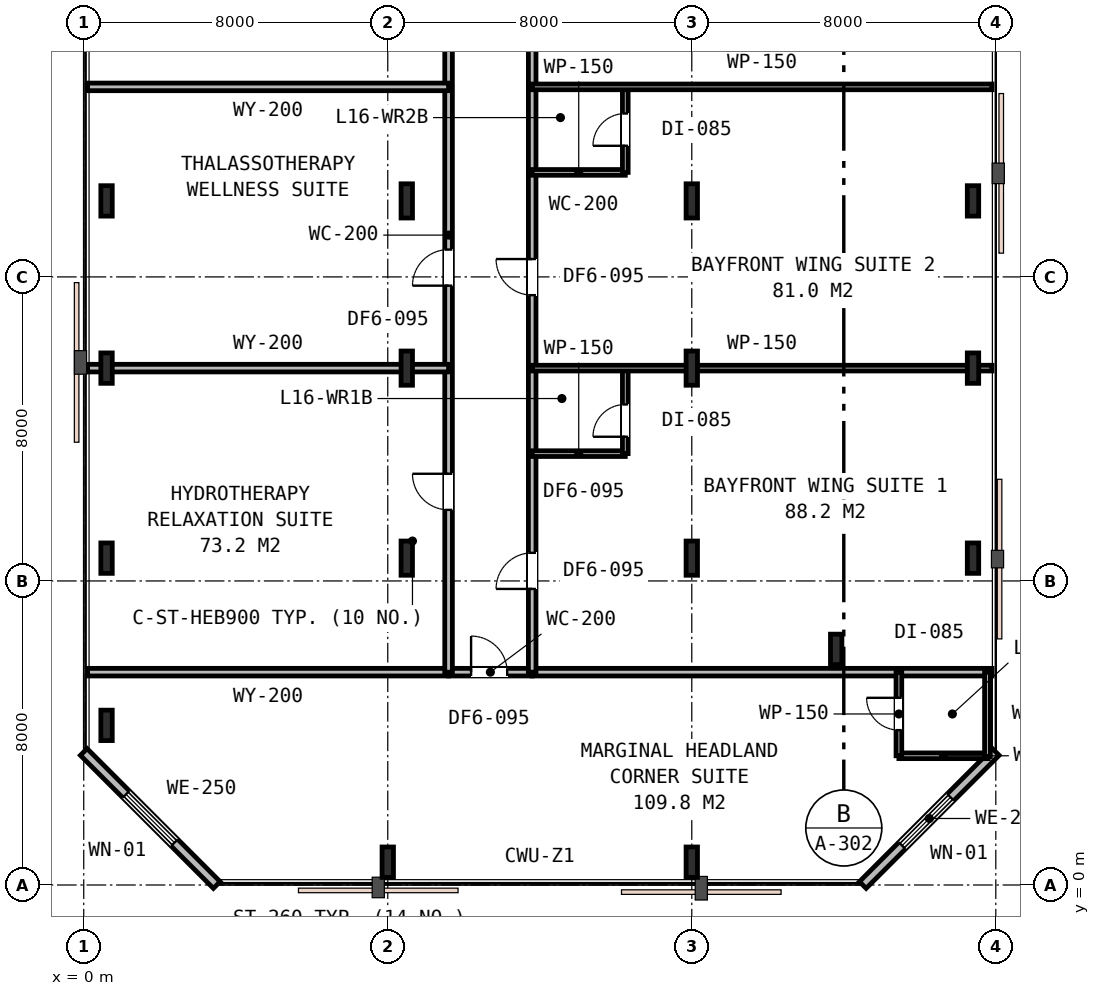
"""IFC4 building model, lengths in metres.
Left out: names, types, materials, properties, quantities, classifications, styles, units other than length and angle.
Written with IfcOpenShell. Run it as: python <this file> out.ifc"""

import sys

from ifc_helpers import new_model, si_unit, direction, frame, frame_2d, origin, origin_2d, place, context, subcontext, project, spatial, rectangle, i_section, extrude, element, fill, save


model = new_model("IFC4")
c1 = context("Model", 3, precision=1e-05, world=origin(), true_north=direction((0.0, 1.0)))
c2 = subcontext(c1, "Body", "Model", "MODEL_VIEW")
j1 = project(units=[si_unit("LENGTHUNIT", "METRE"), si_unit("PLANEANGLEUNIT", "RADIAN")], contexts=[c1])
p1 = place(None, origin())
s1 = spatial("IfcSite", under=j1, at=p1, CompositionType="ELEMENT")
p2 = place(p1, origin())
s2 = spatial("IfcBuilding", under=s1, at=p2, CompositionType="ELEMENT")
p3 = place(p2, frame((0.0, 0.0, 65.4)))
s3 = spatial("IfcBuildingStorey", under=s2, at=p3, CompositionType="ELEMENT", Elevation=65.4)
for number, where, z_axis, x_axis in (
    (1, (0.6, 8.6, 0.0), (0.0, 0.0, 1.0), (1.0, 0.0, 0.0)),
    (2, (0.6, 13.6, 0.0), (0.0, 0.0, 1.0), (1.0, 0.0, 0.0)),
    (3, (0.6, 18.0, 0.0), (0.0, 0.0, 1.0), (1.0, 0.0, 0.0)),
    (4, (0.6, 4.2, 0.0), (0.0, 0.0, 1.0), (1.0, 0.0, 0.0)),
    (5, (8.0, 0.6, 0.0), (0.0, 0.0, 1.0), (1.0, 0.0, 0.0)),
    (6, (16.0, 0.6, 0.0), (0.0, 0.0, 1.0), (1.0, 0.0, 0.0)),
    (7, (19.8, 6.2, 0.0), (0.0, 0.0, 1.0), (1.0, 0.0, 0.0)),
    (8, (23.4, 8.6, 0.0), (0.0, 0.0, 1.0), (1.0, 0.0, 0.0)),
    (9, (23.4, 13.6, 0.0), (0.0, 0.0, 1.0), (1.0, 0.0, 0.0)),
    (10, (23.4, 18.0, 0.0), (0.0, 0.0, 1.0), (1.0, 0.0, 0.0)),
):
    element("IfcColumn", number, at=place(p3, frame(where, z_axis=z_axis, x_axis=x_axis)), inside=s3, PredefinedType="COLUMN", context=c2, shape_type="SweptSolid", body=[
        extrude(i_section(OverallWidth=0.3, OverallDepth=0.8, WebThickness=0.018, FlangeThickness=0.033, FilletRadius=0.03, at=origin_2d()), origin(), (0.0, 0.0, 1.0), 3.6),
    ])
for number, where, z_axis, x_axis in (
    (11, (8.5, 8.6, 0.0), (0.0, 0.0, 1.0), (1.0, 0.0, 0.0)),
    (12, (16.0, 8.6, 0.0), (0.0, 0.0, 1.0), (1.0, 0.0, 0.0)),
    (13, (8.5, 13.6, 0.0), (0.0, 0.0, 1.0), (1.0, 0.0, 0.0)),
    (14, (16.0, 13.6, 0.0), (0.0, 0.0, 1.0), (1.0, 0.0, 0.0)),
    (15, (8.5, 18.0, 0.0), (0.0, 0.0, 1.0), (1.0, 0.0, 0.0)),
    (16, (16.0, 18.0, 0.0), (0.0, 0.0, 1.0), (1.0, 0.0, 0.0)),
):
    element("IfcColumn", number, at=place(p3, frame(where, z_axis=z_axis, x_axis=x_axis)), inside=s3, PredefinedType="COLUMN", context=c2, shape_type="SweptSolid", body=[
        extrude(i_section(OverallWidth=0.3, OverallDepth=0.9, WebThickness=0.018, FlangeThickness=0.035, FilletRadius=0.03, at=origin_2d()), origin(), (0.0, 0.0, 1.0), 3.6),
    ])
p4 = place(p3, frame((20.5, 0.0, 0.0), z_axis=(0.0, 0.0, 1.0), x_axis=(0.707106781187, 0.707106781187, 0.0)))
e17 = element("IfcWall", 17, at=p4, inside=s3, PredefinedType="STANDARD", context=c2, shape_type="SweptSolid", body=[
    extrude(rectangle(XDim=4.95, YDim=0.25, at=frame_2d((2.475, 0.0))), origin(), (0.0, 0.0, 1.0), 3.33),
])
p5 = place(p4, frame((1.465, 0.0, 0.75)))
e18 = element("IfcOpeningElement", 18, at=p5, cuts=e17, PredefinedType="OPENING", context=c2, shape_type="SweptSolid", body=[
    extrude(rectangle(XDim=1.8, YDim=1.85, at=frame_2d((0.9, 0.925))), frame((0.0, 0.135, 0.0), z_axis=(0.0, -1.0, 0.0), x_axis=(1.0, 0.0, 0.0)), (0.0, 0.0, 1.0), 0.27),
])
p6 = place(p3, frame((0.0, 3.5, 0.0), z_axis=(0.0, 0.0, 1.0), x_axis=(0.707106781187, -0.707106781187, 0.0)))
e19 = element("IfcWall", 19, at=p6, inside=s3, PredefinedType="STANDARD", context=c2, shape_type="SweptSolid", body=[
    extrude(rectangle(XDim=4.95, YDim=0.25, at=frame_2d((2.475, 0.0))), origin(), (0.0, 0.0, 1.0), 3.33),
])
p7 = place(p6, frame((1.575, 0.0, 0.75)))
e20 = element("IfcOpeningElement", 20, at=p7, cuts=e19, PredefinedType="OPENING", context=c2, shape_type="SweptSolid", body=[
    extrude(rectangle(XDim=1.8, YDim=1.85, at=frame_2d((0.9, 0.925))), frame((0.0, 0.135, 0.0), z_axis=(0.0, -1.0, 0.0), x_axis=(1.0, 0.0, 0.0)), (0.0, 0.0, 1.0), 0.27),
])
p8 = place(p3, frame((0.1, 5.6, 0.0), z_axis=(0.0, 0.0, 1.0), x_axis=(1.0, 0.0, 0.0)))
e21 = element("IfcWall", 21, at=p8, inside=s3, PredefinedType="PARTITIONING", context=c2, shape_type="SweptSolid", body=[
    extrude(rectangle(XDim=9.5, YDim=0.2, at=frame_2d((4.75, 0.0))), origin(), (0.0, 0.0, 1.0), 2.92),
])
p9 = place(p3, frame((11.8, 5.6, 0.0), z_axis=(0.0, 0.0, 1.0), x_axis=(1.0, 0.0, 0.0)))
e22 = element("IfcWall", 22, at=p9, inside=s3, PredefinedType="PARTITIONING", context=c2, shape_type="SweptSolid", body=[
    extrude(rectangle(XDim=12.1, YDim=0.2, at=frame_2d((6.05, 0.0))), origin(), (0.0, 0.0, 1.0), 2.83),
])
p10 = place(p3, frame((9.6, 5.6, 0.0), z_axis=(0.0, 0.0, 1.0), x_axis=(1.0, 0.0, 0.0)))
e23 = element("IfcWall", 23, at=p10, inside=s3, PredefinedType="PARTITIONING", context=c2, shape_type="SweptSolid", body=[
    extrude(rectangle(XDim=2.2, YDim=0.2, at=frame_2d((1.1, 0.0))), origin(), (0.0, 0.0, 1.0), 3.33),
])
p11 = place(p10, frame((0.593, 0.0, 0.0)))
e24 = element("IfcOpeningElement", 24, at=p11, cuts=e23, PredefinedType="OPENING", context=c2, shape_type="SweptSolid", body=[
    extrude(rectangle(XDim=0.95, YDim=2.15, at=frame_2d((0.475, 1.075))), frame((0.0, 0.11, 0.0), z_axis=(0.0, -1.0, 0.0), x_axis=(1.0, 0.0, 0.0)), (0.0, 0.0, 1.0), 0.22),
])
p12 = place(p3, frame((21.45, 3.4, 0.0), z_axis=(0.0, 0.0, 1.0), x_axis=(1.0, 0.0, 0.0)))
e25 = element("IfcWall", 25, at=p12, inside=s3, PredefinedType="PARTITIONING", context=c2, shape_type="SweptSolid", body=[
    extrude(rectangle(XDim=2.35, YDim=0.15, at=frame_2d((1.175, 0.0))), origin(), (0.0, 0.0, 1.0), 3.33),
])
p13 = place(p3, frame((21.45, 3.4, 0.0), z_axis=(0.0, 0.0, 1.0), x_axis=(0.0, 1.0, 0.0)))
e26 = element("IfcWall", 26, at=p13, inside=s3, PredefinedType="PARTITIONING", context=c2, shape_type="SweptSolid", body=[
    extrude(rectangle(XDim=2.2, YDim=0.15, at=frame_2d((1.1, 0.0))), origin(), (0.0, 0.0, 1.0), 3.33),
])
p14 = place(p13, frame((0.675, 0.0, 0.0)))
e27 = element("IfcOpeningElement", 27, at=p14, cuts=e26, PredefinedType="OPENING", context=c2, shape_type="SweptSolid", body=[
    extrude(rectangle(XDim=0.85, YDim=2.15, at=frame_2d((0.425, 1.075))), frame((0.0, 0.085, 0.0), z_axis=(0.0, -1.0, 0.0), x_axis=(1.0, 0.0, 0.0)), (0.0, 0.0, 1.0), 0.17),
])
p15 = place(p3, frame((23.78, 5.6, 0.0), z_axis=(0.0, 0.0, 1.0), x_axis=(0.0, -1.0, 0.0)))
e28 = element("IfcWall", 28, at=p15, inside=s3, PredefinedType="PARTITIONING", context=c2, shape_type="SweptSolid", body=[
    extrude(rectangle(XDim=2.22, YDim=0.15, at=frame_2d((1.11, 0.0))), origin(), (0.0, 0.0, 1.0), 3.33),
])
p16 = place(p3, frame((9.6, 5.6, 0.0), z_axis=(0.0, 0.0, 1.0), x_axis=(0.0, 1.0, 0.0)))
e29 = element("IfcWall", 29, at=p16, inside=s3, PredefinedType="PARTITIONING", context=c2, shape_type="SweptSolid", body=[
    extrude(rectangle(XDim=23.0, YDim=0.2, at=frame_2d((11.5, 0.0))), origin(), (0.0, 0.0, 1.0), 2.83),
])
p17 = place(p16, frame((4.27, 0.0, 0.0)))
e30 = element("IfcOpeningElement", 30, at=p17, cuts=e29, PredefinedType="OPENING", context=c2, shape_type="SweptSolid", body=[
    extrude(rectangle(XDim=0.95, YDim=2.15, at=frame_2d((0.475, 1.075))), frame((0.0, 0.11, 0.0), z_axis=(0.0, -1.0, 0.0), x_axis=(1.0, 0.0, 0.0)), (0.0, 0.0, 1.0), 0.22),
])
p18 = place(p16, frame((10.17, 0.0, 0.0)))
e31 = element("IfcOpeningElement", 31, at=p18, cuts=e29, PredefinedType="OPENING", context=c2, shape_type="SweptSolid", body=[
    extrude(rectangle(XDim=0.95, YDim=2.15, at=frame_2d((0.475, 1.075))), frame((0.0, 0.11, 0.0), z_axis=(0.0, -1.0, 0.0), x_axis=(1.0, 0.0, 0.0)), (0.0, 0.0, 1.0), 0.22),
])
p19 = place(p16, frame((19.693, 0.0, 0.0)))
e32 = element("IfcOpeningElement", 32, at=p19, cuts=e29, PredefinedType="OPENING", context=c2, shape_type="SweptSolid", body=[
    extrude(rectangle(XDim=0.95, YDim=2.15, at=frame_2d((0.475, 1.075))), frame((0.0, 0.11, 0.0), z_axis=(0.0, -1.0, 0.0), x_axis=(1.0, 0.0, 0.0)), (0.0, 0.0, 1.0), 0.22),
])
p20 = place(p3, frame((11.8, 5.6, 0.0), z_axis=(0.0, 0.0, 1.0), x_axis=(0.0, 1.0, 0.0)))
e33 = element("IfcWall", 33, at=p20, inside=s3, PredefinedType="PARTITIONING", context=c2, shape_type="SweptSolid", body=[
    extrude(rectangle(XDim=23.0, YDim=0.2, at=frame_2d((11.5, 0.0))), origin(), (0.0, 0.0, 1.0), 2.83),
])
p21 = place(p20, frame((2.19, 0.0, 0.0)))
e34 = element("IfcOpeningElement", 34, at=p21, cuts=e33, PredefinedType="OPENING", context=c2, shape_type="SweptSolid", body=[
    extrude(rectangle(XDim=0.95, YDim=2.15, at=frame_2d((0.475, 1.075))), frame((0.0, 0.11, 0.0), z_axis=(0.0, -1.0, 0.0), x_axis=(1.0, 0.0, 0.0)), (0.0, 0.0, 1.0), 0.22),
])
p22 = place(p20, frame((9.92, 0.0, 0.0)))
e35 = element("IfcOpeningElement", 35, at=p22, cuts=e33, PredefinedType="OPENING", context=c2, shape_type="SweptSolid", body=[
    extrude(rectangle(XDim=0.95, YDim=2.15, at=frame_2d((0.475, 1.075))), frame((0.0, 0.11, 0.0), z_axis=(0.0, -1.0, 0.0), x_axis=(1.0, 0.0, 0.0)), (0.0, 0.0, 1.0), 0.22),
])
p23 = place(p20, frame((17.41, 0.0, 0.0)))
e36 = element("IfcOpeningElement", 36, at=p23, cuts=e33, PredefinedType="OPENING", context=c2, shape_type="SweptSolid", body=[
    extrude(rectangle(XDim=0.95, YDim=2.15, at=frame_2d((0.475, 1.075))), frame((0.0, 0.11, 0.0), z_axis=(0.0, -1.0, 0.0), x_axis=(1.0, 0.0, 0.0)), (0.0, 0.0, 1.0), 0.22),
])
p24 = place(p3, frame((11.8, 11.35, 0.0), z_axis=(0.0, 0.0, 1.0), x_axis=(1.0, 0.0, 0.0)))
e37 = element("IfcWall", 37, at=p24, inside=s3, PredefinedType="PARTITIONING", context=c2, shape_type="SweptSolid", body=[
    extrude(rectangle(XDim=2.45, YDim=0.15, at=frame_2d((1.225, 0.0))), origin(), (0.0, 0.0, 1.0), 3.02),
])
p25 = place(p3, frame((14.25, 11.35, 0.0), z_axis=(0.0, 0.0, 1.0), x_axis=(0.0, 1.0, 0.0)))
e38 = element("IfcWall", 38, at=p25, inside=s3, PredefinedType="PARTITIONING", context=c2, shape_type="SweptSolid", body=[
    extrude(rectangle(XDim=2.25, YDim=0.15, at=frame_2d((1.125, 0.0))), origin(), (0.0, 0.0, 1.0), 2.83),
])
p26 = place(p25, frame((0.444, 0.0, 0.0)))
e39 = element("IfcOpeningElement", 39, at=p26, cuts=e38, PredefinedType="OPENING", context=c2, shape_type="SweptSolid", body=[
    extrude(rectangle(XDim=0.85, YDim=2.15, at=frame_2d((0.425, 1.075))), frame((0.0, 0.085, 0.0), z_axis=(0.0, -1.0, 0.0), x_axis=(1.0, 0.0, 0.0)), (0.0, 0.0, 1.0), 0.17),
])
p27 = place(p3, frame((11.8, 13.6, 0.0), z_axis=(0.0, 0.0, 1.0), x_axis=(1.0, 0.0, 0.0)))
e40 = element("IfcWall", 40, at=p27, inside=s3, PredefinedType="PARTITIONING", context=c2, shape_type="SweptSolid", body=[
    extrude(rectangle(XDim=12.1, YDim=0.15, at=frame_2d((6.05, 0.0))), origin(), (0.0, 0.0, 1.0), 2.83),
])
p28 = place(p3, frame((0.1, 13.6, 0.0), z_axis=(0.0, 0.0, 1.0), x_axis=(1.0, 0.0, 0.0)))
e41 = element("IfcWall", 41, at=p28, inside=s3, PredefinedType="PARTITIONING", context=c2, shape_type="SweptSolid", body=[
    extrude(rectangle(XDim=9.5, YDim=0.2, at=frame_2d((4.75, 0.0))), origin(), (0.0, 0.0, 1.0), 2.83),
])
p29 = place(p3, frame((11.8, 18.75, 0.0), z_axis=(0.0, 0.0, 1.0), x_axis=(1.0, 0.0, 0.0)))
e42 = element("IfcWall", 42, at=p29, inside=s3, PredefinedType="PARTITIONING", context=c2, shape_type="SweptSolid", body=[
    extrude(rectangle(XDim=2.45, YDim=0.15, at=frame_2d((1.225, 0.0))), origin(), (0.0, 0.0, 1.0), 3.33),
])
p30 = place(p3, frame((14.25, 18.75, 0.0), z_axis=(0.0, 0.0, 1.0), x_axis=(0.0, 1.0, 0.0)))
e43 = element("IfcWall", 43, at=p30, inside=s3, PredefinedType="PARTITIONING", context=c2, shape_type="SweptSolid", body=[
    extrude(rectangle(XDim=2.25, YDim=0.15, at=frame_2d((1.125, 0.0))), origin(), (0.0, 0.0, 1.0), 3.33),
])
p31 = place(p30, frame((0.7, 0.0, 0.0)))
e44 = element("IfcOpeningElement", 44, at=p31, cuts=e43, PredefinedType="OPENING", context=c2, shape_type="SweptSolid", body=[
    extrude(rectangle(XDim=0.85, YDim=2.15, at=frame_2d((0.425, 1.075))), frame((0.0, 0.085, 0.0), z_axis=(0.0, -1.0, 0.0), x_axis=(1.0, 0.0, 0.0)), (0.0, 0.0, 1.0), 0.17),
])
p32 = place(p3, frame((11.8, 21.0, 0.0), z_axis=(0.0, 0.0, 1.0), x_axis=(1.0, 0.0, 0.0)))
e45 = element("IfcWall", 45, at=p32, inside=s3, PredefinedType="PARTITIONING", context=c2, shape_type="SweptSolid", body=[
    extrude(rectangle(XDim=12.1, YDim=0.15, at=frame_2d((6.05, 0.0))), origin(), (0.0, 0.0, 1.0), 2.83),
])
p33 = place(p3, frame((0.1, 21.0, 0.0), z_axis=(0.0, 0.0, 1.0), x_axis=(1.0, 0.0, 0.0)))
e46 = element("IfcWall", 46, at=p33, inside=s3, PredefinedType="PARTITIONING", context=c2, shape_type="SweptSolid", body=[
    extrude(rectangle(XDim=9.5, YDim=0.2, at=frame_2d((4.75, 0.0))), origin(), (0.0, 0.0, 1.0), 2.83),
])
p34 = place(p5, origin())
e47 = element("IfcWindow", 47, at=p34, inside=s3, PartitioningType="SINGLE_PANEL", PredefinedType="WINDOW", context=c2, shape_type="SweptSolid", body=[
    extrude(rectangle(XDim=1.8, YDim=1.85, at=frame_2d((0.9, 0.925))), frame((0.0, 0.03, 0.0), z_axis=(0.0, -1.0, 0.0), x_axis=(1.0, 0.0, 0.0)), (0.0, 0.0, 1.0), 0.06),
])
fill(e18, e47)
p35 = place(p7, origin())
e48 = element("IfcWindow", 48, at=p35, inside=s3, PartitioningType="SINGLE_PANEL", PredefinedType="WINDOW", context=c2, shape_type="SweptSolid", body=[
    extrude(rectangle(XDim=1.8, YDim=1.85, at=frame_2d((0.9, 0.925))), frame((0.0, 0.03, 0.0), z_axis=(0.0, -1.0, 0.0), x_axis=(1.0, 0.0, 0.0)), (0.0, 0.0, 1.0), 0.06),
])
fill(e20, e48)
p36 = place(p11, origin())
e49 = element("IfcDoor", 49, at=p36, inside=s3, OperationType="SINGLE_SWING_LEFT", PredefinedType="DOOR", context=c2, shape_type="SweptSolid", body=[
    extrude(rectangle(XDim=0.95, YDim=2.15, at=frame_2d((0.475, 1.075))), frame((0.0, 0.025, 0.0), z_axis=(0.0, -1.0, 0.0), x_axis=(1.0, 0.0, 0.0)), (0.0, 0.0, 1.0), 0.05),
])
fill(e24, e49)
p37 = place(p14, origin())
e50 = element("IfcDoor", 50, at=p37, inside=s3, OperationType="SINGLE_SWING_RIGHT", PredefinedType="DOOR", context=c2, shape_type="SweptSolid", body=[
    extrude(rectangle(XDim=0.85, YDim=2.15, at=frame_2d((0.425, 1.075))), frame((0.0, 0.025, 0.0), z_axis=(0.0, -1.0, 0.0), x_axis=(1.0, 0.0, 0.0)), (0.0, 0.0, 1.0), 0.05),
])
fill(e27, e50)
p38 = place(p17, origin())
e51 = element("IfcDoor", 51, at=p38, inside=s3, OperationType="SINGLE_SWING_RIGHT", PredefinedType="DOOR", context=c2, shape_type="SweptSolid", body=[
    extrude(rectangle(XDim=0.95, YDim=2.15, at=frame_2d((0.475, 1.075))), frame((0.0, 0.025, 0.0), z_axis=(0.0, -1.0, 0.0), x_axis=(1.0, 0.0, 0.0)), (0.0, 0.0, 1.0), 0.05),
])
fill(e30, e51)
p39 = place(p21, origin())
e52 = element("IfcDoor", 52, at=p39, inside=s3, OperationType="SINGLE_SWING_LEFT", PredefinedType="DOOR", context=c2, shape_type="SweptSolid", body=[
    extrude(rectangle(XDim=0.95, YDim=2.15, at=frame_2d((0.475, 1.075))), frame((0.0, 0.025, 0.0), z_axis=(0.0, -1.0, 0.0), x_axis=(1.0, 0.0, 0.0)), (0.0, 0.0, 1.0), 0.05),
])
fill(e34, e52)
p40 = place(p26, origin())
e53 = element("IfcDoor", 53, at=p40, inside=s3, OperationType="SINGLE_SWING_LEFT", PredefinedType="DOOR", context=c2, shape_type="SweptSolid", body=[
    extrude(rectangle(XDim=0.85, YDim=2.15, at=frame_2d((0.425, 1.075))), frame((0.0, 0.025, 0.0), z_axis=(0.0, -1.0, 0.0), x_axis=(1.0, 0.0, 0.0)), (0.0, 0.0, 1.0), 0.05),
])
fill(e39, e53)
p41 = place(p18, origin())
e54 = element("IfcDoor", 54, at=p41, inside=s3, OperationType="SINGLE_SWING_LEFT", PredefinedType="DOOR", context=c2, shape_type="SweptSolid", body=[
    extrude(rectangle(XDim=0.95, YDim=2.15, at=frame_2d((0.475, 1.075))), frame((0.0, 0.025, 0.0), z_axis=(0.0, -1.0, 0.0), x_axis=(1.0, 0.0, 0.0)), (0.0, 0.0, 1.0), 0.05),
])
fill(e31, e54)
p42 = place(p22, origin())
e55 = element("IfcDoor", 55, at=p42, inside=s3, OperationType="SINGLE_SWING_RIGHT", PredefinedType="DOOR", context=c2, shape_type="SweptSolid", body=[
    extrude(rectangle(XDim=0.95, YDim=2.15, at=frame_2d((0.475, 1.075))), frame((0.0, 0.025, 0.0), z_axis=(0.0, -1.0, 0.0), x_axis=(1.0, 0.0, 0.0)), (0.0, 0.0, 1.0), 0.05),
])
fill(e35, e55)
p43 = place(p31, origin())
e56 = element("IfcDoor", 56, at=p43, inside=s3, OperationType="SINGLE_SWING_LEFT", PredefinedType="DOOR", context=c2, shape_type="SweptSolid", body=[
    extrude(rectangle(XDim=0.85, YDim=2.15, at=frame_2d((0.425, 1.075))), frame((0.0, 0.025, 0.0), z_axis=(0.0, -1.0, 0.0), x_axis=(1.0, 0.0, 0.0)), (0.0, 0.0, 1.0), 0.05),
])
fill(e44, e56)
save(model, sys.argv[1])
